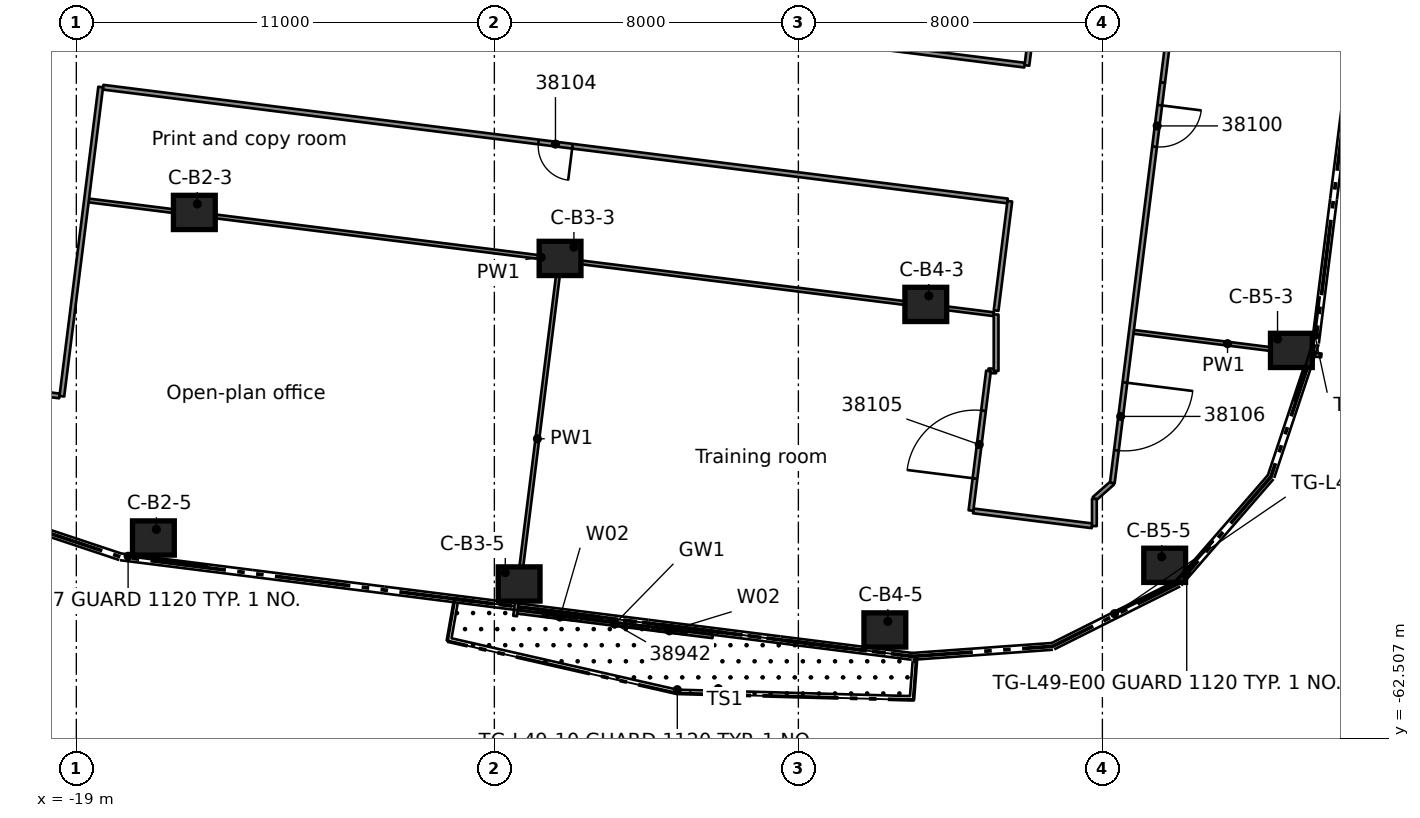
"""IFC4 building model, lengths in metres.
Left out: names, types, materials, properties, quantities, classifications, styles, units other than length and angle.
Written with IfcOpenShell. Run it as: python <this file> out.ifc"""

import sys

from ifc_helpers import new_model, si_unit, direction, frame, frame_2d, origin, origin_2d, place, context, subcontext, project, spatial, rectangle, extrude, element, fill, save


model = new_model("IFC4")
c1 = context("Model", 3, precision=1e-05, world=origin(), true_north=direction((0.0, 1.0)))
c2 = subcontext(c1, "Body", "Model", "MODEL_VIEW")
j1 = project(units=[si_unit("LENGTHUNIT", "METRE"), si_unit("PLANEANGLEUNIT", "RADIAN")], contexts=[c1])
p1 = place(None, origin())
s1 = spatial("IfcSite", under=j1, at=p1, CompositionType="ELEMENT")
p2 = place(p1, origin())
s2 = spatial("IfcBuilding", under=s1, at=p2, CompositionType="ELEMENT")
p3 = place(p2, frame((0.0, 0.0, 188.6)))
s3 = spatial("IfcBuildingStorey", under=s2, at=p3, CompositionType="ELEMENT", Elevation=188.6)
for number, where, z_axis, x_axis in (
    (1, (-15.895, -48.664, 0.0), (0.0, 0.0, 1.0), (1.0, 0.0, 0.0)),
    (2, (-16.972, -57.23, 0.0), (0.0, 0.0, 1.0), (1.0, 0.0, 0.0)),
    (3, (-6.271, -49.874, 0.0), (0.0, 0.0, 1.0), (1.0, 0.0, 0.0)),
    (4, (-7.348, -58.44, 0.0), (0.0, 0.0, 1.0), (1.0, 0.0, 0.0)),
    (5, (3.353, -51.084, 0.0), (0.0, 0.0, 1.0), (1.0, 0.0, 0.0)),
    (6, (2.276, -59.65, 0.0), (0.0, 0.0, 1.0), (1.0, 0.0, 0.0)),
    (7, (12.973, -52.294, 0.0), (0.0, 0.0, 1.0), (1.0, 0.0, 0.0)),
    (8, (9.639, -57.949, 0.0), (0.0, 0.0, 1.0), (1.0, 0.0, 0.0)),
):
    element("IfcColumn", number, at=place(p3, frame(where, z_axis=z_axis, x_axis=x_axis)), inside=s3, PredefinedType="COLUMN", context=c2, shape_type="SweptSolid", body=[
        extrude(rectangle(XDim=1.1, YDim=0.9, at=origin_2d()), origin(), (0.0, 0.0, 1.0), 3.5),
    ])
p4 = place(p3, frame((-2.255, -59.816, 0.0), z_axis=(0.0, 0.0, 1.0), x_axis=(-0.992182235567, 0.124797481646, 0.0)))
e9 = element("IfcWall", 9, at=p4, inside=s3, PredefinedType="STANDARD", context=c2, shape_type="SweptSolid", body=[
    extrude(rectangle(XDim=5.2, YDim=0.1, at=frame_2d((2.6, 0.0))), origin(), (0.0, 0.0, 1.0), 3.08),
])
p5 = place(p4, frame((1.7, 0.0, 0.0)))
e10 = element("IfcOpeningElement", 10, at=p5, cuts=e9, PredefinedType="OPENING", context=c2, shape_type="SweptSolid", body=[
    extrude(rectangle(XDim=1.8, YDim=2.4, at=frame_2d((0.9, 1.2))), frame((0.0, 0.06, 0.0), z_axis=(0.0, -1.0, 0.0), x_axis=(1.0, 0.0, 0.0)), (0.0, 0.0, 1.0), 0.12),
])
p6 = place(p4, frame((0.7, 0.0, 0.0)))
e11 = element("IfcOpeningElement", 11, at=p6, cuts=e9, PredefinedType="OPENING", context=c2, shape_type="SweptSolid", body=[
    extrude(rectangle(XDim=0.9, YDim=2.4, at=frame_2d((0.45, 1.2))), frame((0.0, 0.06, 0.0), z_axis=(0.0, -1.0, 0.0), x_axis=(1.0, 0.0, 0.0)), (0.0, 0.0, 1.0), 0.12),
])
p7 = place(p4, frame((3.6, 0.0, 0.0)))
e12 = element("IfcOpeningElement", 12, at=p7, cuts=e9, PredefinedType="OPENING", context=c2, shape_type="SweptSolid", body=[
    extrude(rectangle(XDim=0.9, YDim=2.4, at=frame_2d((0.45, 1.2))), frame((0.0, 0.06, 0.0), z_axis=(0.0, -1.0, 0.0), x_axis=(1.0, 0.0, 0.0)), (0.0, 0.0, 1.0), 0.12),
])
p8 = place(p3, frame((-21.773, -53.2, 0.0), z_axis=(0.0, 0.0, 1.0), x_axis=(0.992231399055, -0.124405991537, 0.0)))
e13 = element("IfcWall", 13, at=p8, inside=s3, PredefinedType="PARTITIONING", context=c2, shape_type="SweptSolid", body=[
    extrude(rectangle(XDim=2.347, YDim=0.125, at=frame_2d((1.174, 0.0))), origin(), (0.0, 0.0, 1.0), 3.06),
])
p9 = place(p3, frame((4.603, -56.517, 0.0), z_axis=(0.0, 0.0, 1.0), x_axis=(0.992225298005, -0.124454642333, 0.0)))
e14 = element("IfcWall", 14, at=p9, inside=s3, PredefinedType="PARTITIONING", context=c2, shape_type="SweptSolid", body=[
    extrude(rectangle(XDim=3.148, YDim=0.125, at=frame_2d((1.574, 0.0))), origin(), (0.0, 0.0, 1.0), 3.06),
])
p10 = place(p3, frame((-18.671, -48.349, 0.0), z_axis=(0.0, 0.0, 1.0), x_axis=(0.992194081433, -0.124703266873, 0.0)))
e15 = element("IfcWall", 15, at=p10, inside=s3, PredefinedType="PARTITIONING", context=c2, shape_type="SweptSolid", body=[
    extrude(rectangle(XDim=24.0, YDim=0.1, at=frame_2d((12.0, 0.0))), origin(), (0.0, 0.0, 1.0), 3.06),
])
p11 = place(p3, frame((8.824, -51.806, 0.0), z_axis=(0.0, 0.0, 1.0), x_axis=(0.992182494256, -0.124795424967, 0.0)))
e16 = element("IfcWall", 16, at=p11, inside=s3, PredefinedType="PARTITIONING", context=c2, shape_type="SweptSolid", body=[
    extrude(rectangle(XDim=4.977, YDim=0.1, at=frame_2d((2.488, 0.0))), origin(), (0.0, 0.0, 1.0), 3.06),
])
p12 = place(p3, frame((5.502, -48.361, 0.0), z_axis=(0.0, 0.0, 1.0), x_axis=(-0.992188044587, 0.124751289286, 0.0)))
e17 = element("IfcWall", 17, at=p12, inside=s3, PredefinedType="PARTITIONING", context=c2, shape_type="SweptSolid", body=[
    extrude(rectangle(XDim=23.985, YDim=0.125, at=frame_2d((11.993, 0.0))), origin(), (0.0, 0.0, 1.0), 3.06),
])
p13 = place(p12, frame((11.538, 0.0, 0.0)))
e18 = element("IfcOpeningElement", 18, at=p13, cuts=e17, PredefinedType="OPENING", context=c2, shape_type="SweptSolid", body=[
    extrude(rectangle(XDim=0.9, YDim=2.1, at=frame_2d((0.45, 1.05))), frame((0.0, 0.073, 0.0), z_axis=(0.0, -1.0, 0.0), x_axis=(1.0, 0.0, 0.0)), (0.0, 0.0, 1.0), 0.145),
])
p14 = place(p3, frame((-17.846, -41.797, 0.0), z_axis=(0.0, 0.0, 1.0), x_axis=(0.992194342851, -0.1247011869, 0.0)))
e19 = element("IfcWall", 19, at=p14, inside=s3, PredefinedType="PARTITIONING", context=c2, shape_type="SweptSolid", body=[
    extrude(rectangle(XDim=23.985, YDim=0.125, at=frame_2d((11.993, 0.0))), origin(), (0.0, 0.0, 1.0), 3.06),
])
p15 = place(p14, frame((13.788, 0.0, 0.0)))
e20 = element("IfcOpeningElement", 20, at=p15, cuts=e19, PredefinedType="OPENING", context=c2, shape_type="SweptSolid", body=[
    extrude(rectangle(XDim=1.8, YDim=2.1, at=frame_2d((0.9, 1.05))), frame((0.0, 0.073, 0.0), z_axis=(0.0, -1.0, 0.0), x_axis=(1.0, 0.0, 0.0)), (0.0, 0.0, 1.0), 0.145),
])
p16 = place(p3, frame((7.789, -56.199, 0.0), z_axis=(0.0, 0.0, 1.0), x_axis=(0.749373819913, 0.662147172484, 0.0)))
e21 = element("IfcWall", 21, at=p16, inside=s3, PredefinedType="PARTITIONING", context=c2, shape_type="SweptSolid", body=[
    extrude(rectangle(XDim=0.63, YDim=0.125, at=frame_2d((0.315, 0.0))), origin(), (0.0, 0.0, 1.0), 3.06),
])
p17 = place(p3, frame((5.003, -52.833, 0.0), z_axis=(0.0, 0.0, 1.0), x_axis=(1.0, 0.0, 0.0)))
e22 = element("IfcWall", 22, at=p17, inside=s3, PredefinedType="PARTITIONING", context=c2, shape_type="SweptSolid", body=[
    extrude(rectangle(XDim=0.2, YDim=0.125, at=frame_2d((0.1, 0.0))), origin(), (0.0, 0.0, 1.0), 3.06),
])
p18 = place(p3, frame((9.586, -45.246, 0.0), z_axis=(0.0, 0.0, 1.0), x_axis=(0.124858127037, 0.992174605658, 0.0)))
e23 = element("IfcWall", 23, at=p18, inside=s3, PredefinedType="PARTITIONING", context=c2, shape_type="SweptSolid", body=[
    extrude(rectangle(XDim=5.51, YDim=0.125, at=frame_2d((2.755, 0.0))), origin(), (0.0, 0.0, 1.0), 3.06),
])
p19 = place(p3, frame((9.585, -45.246, 0.0), z_axis=(0.0, 0.0, 1.0), x_axis=(-0.124682713734, -0.992196664425, 0.0)))
e24 = element("IfcWall", 24, at=p19, inside=s3, PredefinedType="PARTITIONING", context=c2, shape_type="SweptSolid", body=[
    extrude(rectangle(XDim=10.619, YDim=0.125, at=frame_2d((5.309, 0.0))), origin(), (0.0, 0.0, 1.0), 3.06),
])
p20 = place(p19, frame((0.6, 0.0, 0.0)))
e25 = element("IfcOpeningElement", 25, at=p20, cuts=e24, PredefinedType="OPENING", context=c2, shape_type="SweptSolid", body=[
    extrude(rectangle(XDim=1.1, YDim=2.1, at=frame_2d((0.55, 1.05))), frame((0.0, 0.073, 0.0), z_axis=(0.0, -1.0, 0.0), x_axis=(1.0, 0.0, 0.0)), (0.0, 0.0, 1.0), 0.145),
])
p21 = place(p19, frame((7.954, 0.0, 0.0)))
e26 = element("IfcOpeningElement", 26, at=p21, cuts=e24, PredefinedType="OPENING", context=c2, shape_type="SweptSolid", body=[
    extrude(rectangle(XDim=1.8, YDim=2.1, at=frame_2d((0.9, 1.05))), frame((0.0, 0.073, 0.0), z_axis=(0.0, -1.0, 0.0), x_axis=(1.0, 0.0, 0.0)), (0.0, 0.0, 1.0), 0.145),
])
p22 = place(p3, frame((4.541, -56.508, 0.0), z_axis=(0.0, 0.0, 1.0), x_axis=(0.12474066762, 0.992189380029, 0.0)))
e27 = element("IfcWall", 27, at=p22, inside=s3, PredefinedType="PARTITIONING", context=c2, shape_type="SweptSolid", body=[
    extrude(rectangle(XDim=3.703, YDim=0.125, at=frame_2d((1.852, 0.0))), origin(), (0.0, 0.0, 1.0), 3.06),
])
p23 = place(p22, frame((0.85, 0.0, 0.0)))
e28 = element("IfcOpeningElement", 28, at=p23, cuts=e27, PredefinedType="OPENING", context=c2, shape_type="SweptSolid", body=[
    extrude(rectangle(XDim=1.8, YDim=2.1, at=frame_2d((0.9, 1.05))), frame((0.0, 0.073, 0.0), z_axis=(0.0, -1.0, 0.0), x_axis=(1.0, 0.0, 0.0)), (0.0, 0.0, 1.0), 0.145),
])
p24 = place(p3, frame((6.496, -40.961, 0.0), z_axis=(0.0, 0.0, 1.0), x_axis=(-0.124749919043, -0.992188216872, 0.0)))
e29 = element("IfcWall", 29, at=p24, inside=s3, PredefinedType="PARTITIONING", context=c2, shape_type="SweptSolid", body=[
    extrude(rectangle(XDim=3.865, YDim=0.125, at=frame_2d((1.933, 0.0))), origin(), (0.0, 0.0, 1.0), 3.06),
])
p25 = place(p3, frame((-7.454, -59.283, 0.0), z_axis=(0.0, 0.0, 1.0), x_axis=(0.124805126351, 0.99218127398, 0.0)))
e30 = element("IfcWall", 30, at=p25, inside=s3, PredefinedType="PARTITIONING", context=c2, shape_type="SweptSolid", body=[
    extrude(rectangle(XDim=9.399, YDim=0.1, at=frame_2d((4.7, 0.0))), origin(), (0.0, 0.0, 1.0), 3.06),
])
p26 = place(p3, frame((-19.381, -53.5, 0.0), z_axis=(0.0, 0.0, 1.0), x_axis=(0.124661325918, 0.992199351854, 0.0)))
e31 = element("IfcWall", 31, at=p26, inside=s3, PredefinedType="PARTITIONING", context=c2, shape_type="SweptSolid", body=[
    extrude(rectangle(XDim=8.2, YDim=0.125, at=frame_2d((4.1, 0.0))), origin(), (0.0, 0.0, 1.0), 3.06),
])
p27 = place(p3, frame((5.203, -51.247, 0.0), z_axis=(0.0, 0.0, 1.0), x_axis=(0.124480149579, 0.992222098303, 0.0)))
e32 = element("IfcWall", 32, at=p27, inside=s3, PredefinedType="PARTITIONING", context=c2, shape_type="SweptSolid", body=[
    extrude(rectangle(XDim=2.901, YDim=0.125, at=frame_2d((1.45, 0.0))), origin(), (0.0, 0.0, 1.0), 3.06),
])
p28 = place(p3, frame((7.789, -56.917, 0.0), z_axis=(0.0, 0.0, 1.0), x_axis=(0.0, 1.0, 0.0)))
e33 = element("IfcWall", 33, at=p28, inside=s3, PredefinedType="PARTITIONING", context=c2, shape_type="SweptSolid", body=[
    extrude(rectangle(XDim=0.718, YDim=0.125, at=frame_2d((0.359, 0.0))), origin(), (0.0, 0.0, 1.0), 3.06),
])
p29 = place(p3, frame((5.203, -52.833, 0.0), z_axis=(0.0, 0.0, 1.0), x_axis=(0.0, 1.0, 0.0)))
e34 = element("IfcWall", 34, at=p29, inside=s3, PredefinedType="PARTITIONING", context=c2, shape_type="SweptSolid", body=[
    extrude(rectangle(XDim=1.483, YDim=0.125, at=frame_2d((0.741, 0.0))), origin(), (0.0, 0.0, 1.0), 3.06),
])
p30 = place(p5, origin())
e35 = element("IfcDoor", 35, at=p30, inside=s3, OperationType="DOUBLE_DOOR_SLIDING", PredefinedType="DOOR", context=c2, shape_type="SweptSolid", body=[
    extrude(rectangle(XDim=1.8, YDim=2.4, at=frame_2d((0.9, 1.2))), frame((0.0, 0.025, 0.0), z_axis=(0.0, -1.0, 0.0), x_axis=(1.0, 0.0, 0.0)), (0.0, 0.0, 1.0), 0.05),
])
fill(e10, e35)
p31 = place(p6, origin())
e36 = element("IfcWindow", 36, at=p31, inside=s3, PartitioningType="SINGLE_PANEL", PredefinedType="WINDOW", context=c2, shape_type="SweptSolid", body=[
    extrude(rectangle(XDim=0.9, YDim=2.4, at=frame_2d((0.45, 1.2))), frame((0.0, 0.03, 0.0), z_axis=(0.0, -1.0, 0.0), x_axis=(1.0, 0.0, 0.0)), (0.0, 0.0, 1.0), 0.06),
])
fill(e11, e36)
p32 = place(p7, origin())
e37 = element("IfcWindow", 37, at=p32, inside=s3, PartitioningType="SINGLE_PANEL", PredefinedType="WINDOW", context=c2, shape_type="SweptSolid", body=[
    extrude(rectangle(XDim=0.9, YDim=2.4, at=frame_2d((0.45, 1.2))), frame((0.0, 0.03, 0.0), z_axis=(0.0, -1.0, 0.0), x_axis=(1.0, 0.0, 0.0)), (0.0, 0.0, 1.0), 0.06),
])
fill(e12, e37)
p33 = place(p20, origin())
e38 = element("IfcDoor", 38, at=p33, inside=s3, OperationType="SINGLE_SWING_LEFT", PredefinedType="DOOR", context=c2, shape_type="SweptSolid", body=[
    extrude(rectangle(XDim=1.1, YDim=2.1, at=frame_2d((0.55, 1.05))), frame((0.0, 0.025, 0.0), z_axis=(0.0, -1.0, 0.0), x_axis=(1.0, 0.0, 0.0)), (0.0, 0.0, 1.0), 0.05),
])
fill(e25, e38)
p34 = place(p13, origin())
e39 = element("IfcDoor", 39, at=p34, inside=s3, OperationType="SINGLE_SWING_LEFT", PredefinedType="DOOR", context=c2, shape_type="SweptSolid", body=[
    extrude(rectangle(XDim=0.9, YDim=2.1, at=frame_2d((0.45, 1.05))), frame((0.0, 0.025, 0.0), z_axis=(0.0, -1.0, 0.0), x_axis=(1.0, 0.0, 0.0)), (0.0, 0.0, 1.0), 0.05),
])
fill(e18, e39)
p35 = place(p23, origin())
e40 = element("IfcDoor", 40, at=p35, inside=s3, OperationType="DOUBLE_DOOR_SINGLE_SWING", PredefinedType="DOOR", context=c2, shape_type="SweptSolid", body=[
    extrude(rectangle(XDim=1.8, YDim=2.1, at=frame_2d((0.9, 1.05))), frame((0.0, 0.025, 0.0), z_axis=(0.0, -1.0, 0.0), x_axis=(1.0, 0.0, 0.0)), (0.0, 0.0, 1.0), 0.05),
])
fill(e28, e40)
p36 = place(p21, origin())
e41 = element("IfcDoor", 41, at=p36, inside=s3, OperationType="DOUBLE_DOOR_SINGLE_SWING", PredefinedType="DOOR", context=c2, shape_type="SweptSolid", body=[
    extrude(rectangle(XDim=1.8, YDim=2.1, at=frame_2d((0.9, 1.05))), frame((0.0, 0.025, 0.0), z_axis=(0.0, -1.0, 0.0), x_axis=(1.0, 0.0, 0.0)), (0.0, 0.0, 1.0), 0.05),
])
fill(e26, e41)
save(model, sys.argv[1])
